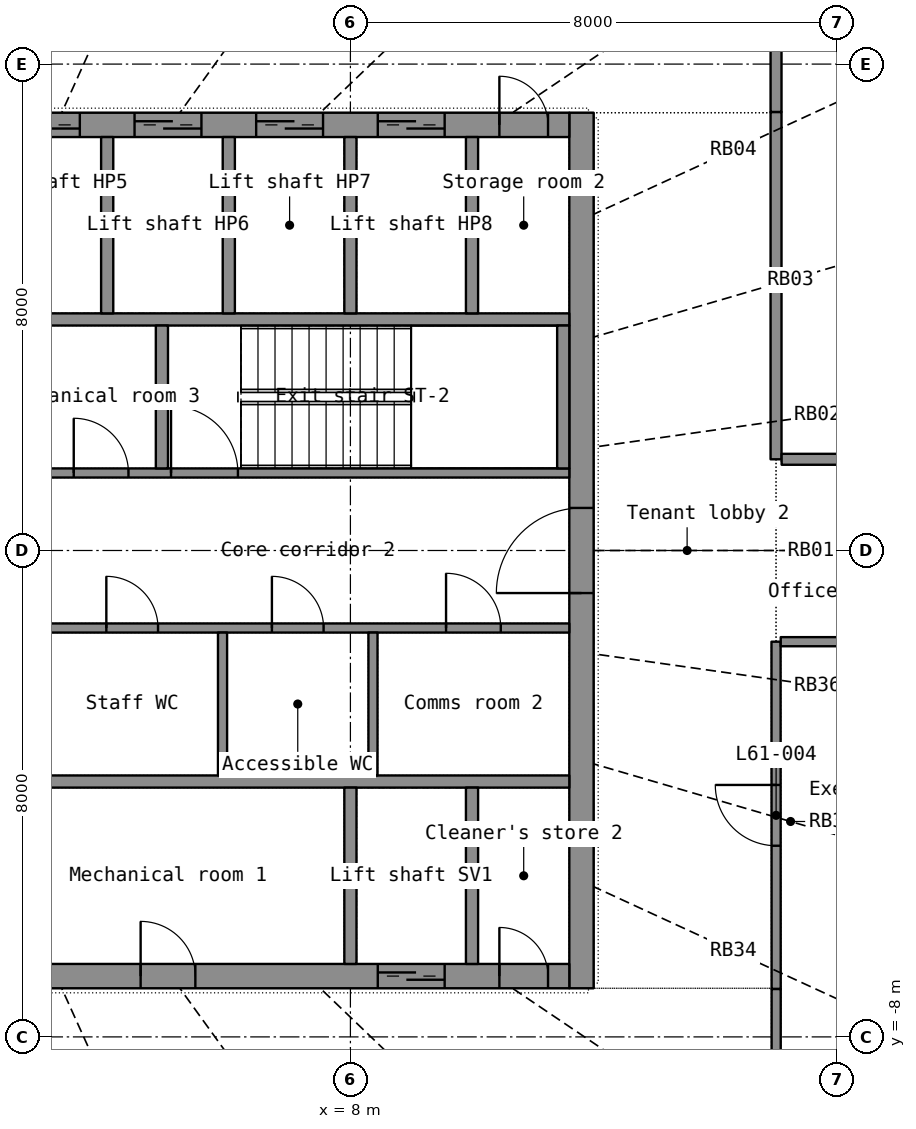
"""IFC4 building model, lengths in metres.
Left out: names, types, materials, properties, quantities, classifications, styles, units other than length and angle.
Written with IfcOpenShell. Run it as: python <this file> out.ifc"""

import sys

from ifc_helpers import new_model, si_unit, direction, frame, frame_2d, origin, place, context, subcontext, project, spatial, rectangle, extrude, element, fill, save


model = new_model("IFC4")
c1 = context("Model", 3, precision=1e-05, world=origin(), true_north=direction((0.0, 1.0)))
c2 = subcontext(c1, "Body", "Model", "MODEL_VIEW")
j1 = project(units=[si_unit("LENGTHUNIT", "METRE"), si_unit("PLANEANGLEUNIT", "RADIAN")], contexts=[c1])
p1 = place(None, origin())
s1 = spatial("IfcSite", under=j1, at=p1, CompositionType="ELEMENT")
p2 = place(p1, origin())
s2 = spatial("IfcBuilding", under=s1, at=p2, CompositionType="ELEMENT")
p3 = place(p2, frame((0.0, 0.0, 250.4)))
s3 = spatial("IfcBuildingStorey", under=s2, at=p3, CompositionType="ELEMENT", Elevation=250.4)
p4 = place(p3, frame((11.8, -7.2, 0.0), z_axis=(0.0, 0.0, 1.0), x_axis=(0.0, 1.0, 0.0)))
e1 = element("IfcWall", 1, at=p4, inside=s3, PredefinedType="SHEAR", context=c2, shape_type="SweptSolid", body=[
    extrude(rectangle(XDim=14.4, YDim=0.4, at=frame_2d((7.2, 0.0))), origin(), (0.0, 0.0, 1.0), 3.3),
])
p5 = place(p4, frame((6.5, 0.0, 0.0)))
e2 = element("IfcOpeningElement", 2, at=p5, cuts=e1, PredefinedType="OPENING", context=c2, shape_type="SweptSolid", body=[
    extrude(rectangle(XDim=1.4, YDim=2.2, at=frame_2d((0.7, 1.1))), frame((0.0, 0.21, 0.0), z_axis=(0.0, -1.0, 0.0), x_axis=(1.0, 0.0, 0.0)), (0.0, 0.0, 1.0), 0.42),
])
p6 = place(p3, frame((-11.6, -7.0, 0.0), z_axis=(0.0, 0.0, 1.0), x_axis=(1.0, 0.0, 0.0)))
e3 = element("IfcWall", 3, at=p6, inside=s3, PredefinedType="SHEAR", context=c2, shape_type="SweptSolid", body=[
    extrude(rectangle(XDim=23.2, YDim=0.4, at=frame_2d((11.6, 0.0))), origin(), (0.0, 0.0, 1.0), 3.3),
])
p7 = place(p6, frame((20.05, 0.0, 0.0)))
e4 = element("IfcOpeningElement", 4, at=p7, cuts=e3, PredefinedType="OPENING", context=c2, shape_type="SweptSolid", body=[
    extrude(rectangle(XDim=1.1, YDim=2.2, at=frame_2d((0.55, 1.1))), frame((0.0, 0.21, 0.0), z_axis=(0.0, -1.0, 0.0), x_axis=(1.0, 0.0, 0.0)), (0.0, 0.0, 1.0), 0.42),
])
p8 = place(p6, frame((4.15, 0.0, 0.0)))
e5 = element("IfcOpeningElement", 5, at=p8, cuts=e3, PredefinedType="OPENING", context=c2, shape_type="SweptSolid", body=[
    extrude(rectangle(XDim=0.9, YDim=2.1, at=frame_2d((0.45, 1.05))), frame((0.0, 0.21, 0.0), z_axis=(0.0, -1.0, 0.0), x_axis=(1.0, 0.0, 0.0)), (0.0, 0.0, 1.0), 0.42),
])
p9 = place(p6, frame((10.15, 0.0, 0.0)))
e6 = element("IfcOpeningElement", 6, at=p9, cuts=e3, PredefinedType="OPENING", context=c2, shape_type="SweptSolid", body=[
    extrude(rectangle(XDim=0.9, YDim=2.1, at=frame_2d((0.45, 1.05))), frame((0.0, 0.21, 0.0), z_axis=(0.0, -1.0, 0.0), x_axis=(1.0, 0.0, 0.0)), (0.0, 0.0, 1.0), 0.42),
])
p10 = place(p6, frame((16.15, 0.0, 0.0)))
e7 = element("IfcOpeningElement", 7, at=p10, cuts=e3, PredefinedType="OPENING", context=c2, shape_type="SweptSolid", body=[
    extrude(rectangle(XDim=0.9, YDim=2.1, at=frame_2d((0.45, 1.05))), frame((0.0, 0.21, 0.0), z_axis=(0.0, -1.0, 0.0), x_axis=(1.0, 0.0, 0.0)), (0.0, 0.0, 1.0), 0.42),
])
p11 = place(p6, frame((0.35, 0.0, 0.0)))
e8 = element("IfcOpeningElement", 8, at=p11, cuts=e3, PredefinedType="OPENING", context=c2, shape_type="SweptSolid", body=[
    extrude(rectangle(XDim=0.8, YDim=2.05, at=frame_2d((0.4, 1.025))), frame((0.0, 0.21, 0.0), z_axis=(0.0, -1.0, 0.0), x_axis=(1.0, 0.0, 0.0)), (0.0, 0.0, 1.0), 0.42),
])
p12 = place(p6, frame((22.05, 0.0, 0.0)))
e9 = element("IfcOpeningElement", 9, at=p12, cuts=e3, PredefinedType="OPENING", context=c2, shape_type="SweptSolid", body=[
    extrude(rectangle(XDim=0.8, YDim=2.05, at=frame_2d((0.4, 1.025))), frame((0.0, 0.21, 0.0), z_axis=(0.0, -1.0, 0.0), x_axis=(1.0, 0.0, 0.0)), (0.0, 0.0, 1.0), 0.42),
])
p13 = place(p3, frame((-11.6, 7.0, 0.0), z_axis=(0.0, 0.0, 1.0), x_axis=(1.0, 0.0, 0.0)))
e10 = element("IfcWall", 10, at=p13, inside=s3, PredefinedType="SHEAR", context=c2, shape_type="SweptSolid", body=[
    extrude(rectangle(XDim=23.2, YDim=0.4, at=frame_2d((11.6, 0.0))), origin(), (0.0, 0.0, 1.0), 3.3),
])
p14 = place(p13, frame((2.05, 0.0, 0.0)))
e11 = element("IfcOpeningElement", 11, at=p14, cuts=e10, PredefinedType="OPENING", context=c2, shape_type="SweptSolid", body=[
    extrude(rectangle(XDim=1.1, YDim=2.2, at=frame_2d((0.55, 1.1))), frame((0.0, 0.21, 0.0), z_axis=(0.0, -1.0, 0.0), x_axis=(1.0, 0.0, 0.0)), (0.0, 0.0, 1.0), 0.42),
])
p15 = place(p13, frame((6.05, 0.0, 0.0)))
e12 = element("IfcOpeningElement", 12, at=p15, cuts=e10, PredefinedType="OPENING", context=c2, shape_type="SweptSolid", body=[
    extrude(rectangle(XDim=1.1, YDim=2.2, at=frame_2d((0.55, 1.1))), frame((0.0, 0.21, 0.0), z_axis=(0.0, -1.0, 0.0), x_axis=(1.0, 0.0, 0.0)), (0.0, 0.0, 1.0), 0.42),
])
p16 = place(p13, frame((8.05, 0.0, 0.0)))
e13 = element("IfcOpeningElement", 13, at=p16, cuts=e10, PredefinedType="OPENING", context=c2, shape_type="SweptSolid", body=[
    extrude(rectangle(XDim=1.1, YDim=2.2, at=frame_2d((0.55, 1.1))), frame((0.0, 0.21, 0.0), z_axis=(0.0, -1.0, 0.0), x_axis=(1.0, 0.0, 0.0)), (0.0, 0.0, 1.0), 0.42),
])
p17 = place(p13, frame((10.05, 0.0, 0.0)))
e14 = element("IfcOpeningElement", 14, at=p17, cuts=e10, PredefinedType="OPENING", context=c2, shape_type="SweptSolid", body=[
    extrude(rectangle(XDim=1.1, YDim=2.2, at=frame_2d((0.55, 1.1))), frame((0.0, 0.21, 0.0), z_axis=(0.0, -1.0, 0.0), x_axis=(1.0, 0.0, 0.0)), (0.0, 0.0, 1.0), 0.42),
])
p18 = place(p13, frame((12.05, 0.0, 0.0)))
e15 = element("IfcOpeningElement", 15, at=p18, cuts=e10, PredefinedType="OPENING", context=c2, shape_type="SweptSolid", body=[
    extrude(rectangle(XDim=1.1, YDim=2.2, at=frame_2d((0.55, 1.1))), frame((0.0, 0.21, 0.0), z_axis=(0.0, -1.0, 0.0), x_axis=(1.0, 0.0, 0.0)), (0.0, 0.0, 1.0), 0.42),
])
p19 = place(p13, frame((14.05, 0.0, 0.0)))
e16 = element("IfcOpeningElement", 16, at=p19, cuts=e10, PredefinedType="OPENING", context=c2, shape_type="SweptSolid", body=[
    extrude(rectangle(XDim=1.1, YDim=2.2, at=frame_2d((0.55, 1.1))), frame((0.0, 0.21, 0.0), z_axis=(0.0, -1.0, 0.0), x_axis=(1.0, 0.0, 0.0)), (0.0, 0.0, 1.0), 0.42),
])
p20 = place(p13, frame((16.05, 0.0, 0.0)))
e17 = element("IfcOpeningElement", 17, at=p20, cuts=e10, PredefinedType="OPENING", context=c2, shape_type="SweptSolid", body=[
    extrude(rectangle(XDim=1.1, YDim=2.2, at=frame_2d((0.55, 1.1))), frame((0.0, 0.21, 0.0), z_axis=(0.0, -1.0, 0.0), x_axis=(1.0, 0.0, 0.0)), (0.0, 0.0, 1.0), 0.42),
])
p21 = place(p13, frame((18.05, 0.0, 0.0)))
e18 = element("IfcOpeningElement", 18, at=p21, cuts=e10, PredefinedType="OPENING", context=c2, shape_type="SweptSolid", body=[
    extrude(rectangle(XDim=1.1, YDim=2.2, at=frame_2d((0.55, 1.1))), frame((0.0, 0.21, 0.0), z_axis=(0.0, -1.0, 0.0), x_axis=(1.0, 0.0, 0.0)), (0.0, 0.0, 1.0), 0.42),
])
p22 = place(p13, frame((20.05, 0.0, 0.0)))
e19 = element("IfcOpeningElement", 19, at=p22, cuts=e10, PredefinedType="OPENING", context=c2, shape_type="SweptSolid", body=[
    extrude(rectangle(XDim=1.1, YDim=2.2, at=frame_2d((0.55, 1.1))), frame((0.0, 0.21, 0.0), z_axis=(0.0, -1.0, 0.0), x_axis=(1.0, 0.0, 0.0)), (0.0, 0.0, 1.0), 0.42),
])
p23 = place(p13, frame((4.15, 0.0, 0.0)))
e20 = element("IfcOpeningElement", 20, at=p23, cuts=e10, PredefinedType="OPENING", context=c2, shape_type="SweptSolid", body=[
    extrude(rectangle(XDim=0.9, YDim=2.1, at=frame_2d((0.45, 1.05))), frame((0.0, 0.21, 0.0), z_axis=(0.0, -1.0, 0.0), x_axis=(1.0, 0.0, 0.0)), (0.0, 0.0, 1.0), 0.42),
])
p24 = place(p13, frame((0.35, 0.0, 0.0)))
e21 = element("IfcOpeningElement", 21, at=p24, cuts=e10, PredefinedType="OPENING", context=c2, shape_type="SweptSolid", body=[
    extrude(rectangle(XDim=0.8, YDim=2.05, at=frame_2d((0.4, 1.025))), frame((0.0, 0.21, 0.0), z_axis=(0.0, -1.0, 0.0), x_axis=(1.0, 0.0, 0.0)), (0.0, 0.0, 1.0), 0.42),
])
p25 = place(p13, frame((22.05, 0.0, 0.0)))
e22 = element("IfcOpeningElement", 22, at=p25, cuts=e10, PredefinedType="OPENING", context=c2, shape_type="SweptSolid", body=[
    extrude(rectangle(XDim=0.8, YDim=2.05, at=frame_2d((0.4, 1.025))), frame((0.0, 0.21, 0.0), z_axis=(0.0, -1.0, 0.0), x_axis=(1.0, 0.0, 0.0)), (0.0, 0.0, 1.0), 0.42),
])
for number, where, z_axis, x_axis in (
    (23, (-11.6, -3.8, 0.0), (0.0, 0.0, 1.0), (1.0, 0.0, 0.0)),
    (24, (-11.6, 3.8, 0.0), (0.0, 0.0, 1.0), (1.0, 0.0, 0.0)),
):
    element("IfcWall", number, at=place(p3, frame(where, z_axis=z_axis, x_axis=x_axis)), inside=s3, PredefinedType="SHEAR", context=c2, shape_type="SweptSolid", body=[
        extrude(rectangle(XDim=23.2, YDim=0.2, at=frame_2d((11.6, 0.0))), origin(), (0.0, 0.0, 1.0), 3.3),
    ])
for number, where, z_axis, x_axis in (
    (25, (8.0, -6.8, 0.0), (0.0, 0.0, 1.0), (0.0, 1.0, 0.0)),
    (26, (10.0, -6.8, 0.0), (0.0, 0.0, 1.0), (0.0, 1.0, 0.0)),
    (27, (4.0, 3.9, 0.0), (0.0, 0.0, 1.0), (0.0, 1.0, 0.0)),
    (28, (6.0, 3.9, 0.0), (0.0, 0.0, 1.0), (0.0, 1.0, 0.0)),
    (29, (8.0, 3.9, 0.0), (0.0, 0.0, 1.0), (0.0, 1.0, 0.0)),
    (30, (10.0, 3.9, 0.0), (0.0, 0.0, 1.0), (0.0, 1.0, 0.0)),
):
    element("IfcWall", number, at=place(p3, frame(where, z_axis=z_axis, x_axis=x_axis)), inside=s3, PredefinedType="SHEAR", context=c2, shape_type="SweptSolid", body=[
        extrude(rectangle(XDim=2.9, YDim=0.2, at=frame_2d((1.45, 0.0))), origin(), (0.0, 0.0, 1.0), 3.3),
    ])
p26 = place(p3, frame((3.0, -1.275, 0.0), z_axis=(0.0, 0.0, 1.0), x_axis=(1.0, 0.0, 0.0)))
e31 = element("IfcWall", 31, at=p26, inside=s3, PredefinedType="PARTITIONING", context=c2, shape_type="SweptSolid", body=[
    extrude(rectangle(XDim=8.6, YDim=0.15, at=frame_2d((4.3, 0.0))), origin(), (0.0, 0.0, 1.0), 3.3),
])
p27 = place(p26, frame((0.986, 0.0, 0.0)))
e32 = element("IfcOpeningElement", 32, at=p27, cuts=e31, PredefinedType="OPENING", context=c2, shape_type="SweptSolid", body=[
    extrude(rectangle(XDim=0.85, YDim=2.1, at=frame_2d((0.425, 1.05))), frame((0.0, 0.085, 0.0), z_axis=(0.0, -1.0, 0.0), x_axis=(1.0, 0.0, 0.0)), (0.0, 0.0, 1.0), 0.17),
])
p28 = place(p26, frame((3.709, 0.0, 0.0)))
e33 = element("IfcOpeningElement", 33, at=p28, cuts=e31, PredefinedType="OPENING", context=c2, shape_type="SweptSolid", body=[
    extrude(rectangle(XDim=0.85, YDim=2.1, at=frame_2d((0.425, 1.05))), frame((0.0, 0.085, 0.0), z_axis=(0.0, -1.0, 0.0), x_axis=(1.0, 0.0, 0.0)), (0.0, 0.0, 1.0), 0.17),
])
p29 = place(p26, frame((6.573, 0.0, 0.0)))
e34 = element("IfcOpeningElement", 34, at=p29, cuts=e31, PredefinedType="OPENING", context=c2, shape_type="SweptSolid", body=[
    extrude(rectangle(XDim=0.9, YDim=2.1, at=frame_2d((0.45, 1.05))), frame((0.0, 0.085, 0.0), z_axis=(0.0, -1.0, 0.0), x_axis=(1.0, 0.0, 0.0)), (0.0, 0.0, 1.0), 0.17),
])
p30 = place(p3, frame((3.0, 1.275, 0.0), z_axis=(0.0, 0.0, 1.0), x_axis=(1.0, 0.0, 0.0)))
e35 = element("IfcWall", 35, at=p30, inside=s3, PredefinedType="SHEAR", context=c2, shape_type="SweptSolid", body=[
    extrude(rectangle(XDim=8.6, YDim=0.15, at=frame_2d((4.3, 0.0))), origin(), (0.0, 0.0, 1.0), 3.3),
])
p31 = place(p30, frame((2.05, 0.0, 0.0)))
e36 = element("IfcOpeningElement", 36, at=p31, cuts=e35, PredefinedType="OPENING", context=c2, shape_type="SweptSolid", body=[
    extrude(rectangle(XDim=1.1, YDim=2.15, at=frame_2d((0.55, 1.075))), frame((0.0, 0.085, 0.0), z_axis=(0.0, -1.0, 0.0), x_axis=(1.0, 0.0, 0.0)), (0.0, 0.0, 1.0), 0.17),
])
p32 = place(p30, frame((0.45, 0.0, 0.0)))
e37 = element("IfcOpeningElement", 37, at=p32, cuts=e35, PredefinedType="OPENING", context=c2, shape_type="SweptSolid", body=[
    extrude(rectangle(XDim=0.9, YDim=2.1, at=frame_2d((0.45, 1.05))), frame((0.0, 0.085, 0.0), z_axis=(0.0, -1.0, 0.0), x_axis=(1.0, 0.0, 0.0)), (0.0, 0.0, 1.0), 0.17),
])
for number, where, z_axis, x_axis in (
    (38, (11.5, 1.35, 0.0), (0.0, 0.0, 1.0), (0.0, 1.0, 0.0)),
    (39, (4.9, 1.35, 0.0), (0.0, 0.0, 1.0), (0.0, 1.0, 0.0)),
):
    element("IfcWall", number, at=place(p3, frame(where, z_axis=z_axis, x_axis=x_axis)), inside=s3, PredefinedType="SHEAR", context=c2, shape_type="SweptSolid", body=[
        extrude(rectangle(XDim=2.35, YDim=0.2, at=frame_2d((1.175, 0.0))), origin(), (0.0, 0.0, 1.0), 3.3),
    ])
for number, where, z_axis, x_axis in (
    (40, (5.897, -3.7, 0.0), (0.0, 0.0, 1.0), (0.0, 1.0, 0.0)),
    (41, (8.371, -3.7, 0.0), (0.0, 0.0, 1.0), (0.0, 1.0, 0.0)),
):
    element("IfcWall", number, at=place(p3, frame(where, z_axis=z_axis, x_axis=x_axis)), inside=s3, PredefinedType="PARTITIONING", context=c2, shape_type="SweptSolid", body=[
        extrude(rectangle(XDim=2.35, YDim=0.15, at=frame_2d((1.175, 0.0))), origin(), (0.0, 0.0, 1.0), 3.3),
    ])
p33 = place(p3, frame((15.0, 1.5, 0.0), z_axis=(0.0, 0.0, 1.0), x_axis=(0.0, 1.0, 0.0)))
e42 = element("IfcWall", 42, at=p33, inside=s3, PredefinedType="PARTITIONING", context=c2, shape_type="SweptSolid", body=[
    extrude(rectangle(XDim=5.712, YDim=0.18, at=frame_2d((2.856, 0.0))), origin(), (0.0, 0.0, 1.0), 2.4),
])
p34 = place(p3, frame((15.002, -7.212, 0.0), z_axis=(0.0, 0.0, 1.0), x_axis=(-0.000341939, 0.999999942, 0.0)))
e43 = element("IfcWall", 43, at=p34, inside=s3, PredefinedType="PARTITIONING", context=c2, shape_type="SweptSolid", body=[
    extrude(rectangle(XDim=5.712, YDim=0.15, at=frame_2d((2.856, 0.0))), origin(), (0.0, 0.0, 1.0), 2.4),
])
p35 = place(p34, frame((2.356, 0.0, 0.0)))
e44 = element("IfcOpeningElement", 44, at=p35, cuts=e43, PredefinedType="OPENING", context=c2, shape_type="SweptSolid", body=[
    extrude(rectangle(XDim=1.0, YDim=2.4, at=frame_2d((0.5, 1.2))), frame((0.0, 0.085, 0.0), z_axis=(0.0, -1.0, 0.0), x_axis=(1.0, 0.0, 0.0)), (0.0, 0.0, 1.0), 0.17),
])
p36 = place(p3, frame((15.077, -1.5, 0.0), z_axis=(0.0, 0.0, 1.0), x_axis=(1.0, 0.0, 0.0)))
e45 = element("IfcWall", 45, at=p36, inside=s3, PredefinedType="PARTITIONING", context=c2, shape_type="SweptSolid", body=[
    extrude(rectangle(XDim=2.871, YDim=0.15, at=frame_2d((1.436, 0.0))), origin(), (0.0, 0.0, 1.0), 2.4),
])
p37 = place(p3, frame((17.948, 1.5, 0.0), z_axis=(0.0, 0.0, 1.0), x_axis=(-1.0, 0.0, 0.0)))
e46 = element("IfcWall", 46, at=p37, inside=s3, PredefinedType="PARTITIONING", context=c2, shape_type="SweptSolid", body=[
    extrude(rectangle(XDim=2.856, YDim=0.18, at=frame_2d((1.428, 0.0))), origin(), (0.0, 0.0, 1.0), 2.4),
])
p38 = place(p3, frame((15.002, -9.525, 0.0), z_axis=(0.0, 0.0, 1.0), x_axis=(0.0, 1.0, 0.0)))
e47 = element("IfcWall", 47, at=p38, inside=s3, PredefinedType="PARTITIONING", context=c2, shape_type="SweptSolid", body=[
    extrude(rectangle(XDim=2.312, YDim=0.15, at=frame_2d((1.156, 0.0))), origin(), (0.0, 0.0, 1.0), 2.4),
])
p39 = place(p3, frame((15.0, 7.213, 0.0), z_axis=(0.0, 0.0, 1.0), x_axis=(0.0, 1.0, 0.0)))
e48 = element("IfcWall", 48, at=p39, inside=s3, PredefinedType="PARTITIONING", context=c2, shape_type="SweptSolid", body=[
    extrude(rectangle(XDim=2.295, YDim=0.18, at=frame_2d((1.147, 0.0))), origin(), (0.0, 0.0, 1.0), 2.4),
])
p40 = place(p7, origin())
e49 = element("IfcDoor", 49, at=p40, inside=s3, OperationType="DOUBLE_DOOR_SLIDING", PredefinedType="DOOR", context=c2, shape_type="SweptSolid", body=[
    extrude(rectangle(XDim=1.1, YDim=2.2, at=frame_2d((0.55, 1.1))), frame((0.0, 0.025, 0.0), z_axis=(0.0, -1.0, 0.0), x_axis=(1.0, 0.0, 0.0)), (0.0, 0.0, 1.0), 0.05),
])
fill(e4, e49)
p41 = place(p10, origin())
e50 = element("IfcDoor", 50, at=p41, inside=s3, OperationType="SINGLE_SWING_LEFT", PredefinedType="DOOR", context=c2, shape_type="SweptSolid", body=[
    extrude(rectangle(XDim=0.9, YDim=2.1, at=frame_2d((0.45, 1.05))), frame((0.0, 0.025, 0.0), z_axis=(0.0, -1.0, 0.0), x_axis=(1.0, 0.0, 0.0)), (0.0, 0.0, 1.0), 0.05),
])
fill(e7, e50)
p42 = place(p12, origin())
e51 = element("IfcDoor", 51, at=p42, inside=s3, OperationType="SINGLE_SWING_LEFT", PredefinedType="DOOR", context=c2, shape_type="SweptSolid", body=[
    extrude(rectangle(XDim=0.8, YDim=2.05, at=frame_2d((0.4, 1.025))), frame((0.0, 0.025, 0.0), z_axis=(0.0, -1.0, 0.0), x_axis=(1.0, 0.0, 0.0)), (0.0, 0.0, 1.0), 0.05),
])
fill(e9, e51)
p43 = place(p19, origin())
e52 = element("IfcDoor", 52, at=p43, inside=s3, OperationType="DOUBLE_DOOR_SLIDING", PredefinedType="DOOR", context=c2, shape_type="SweptSolid", body=[
    extrude(rectangle(XDim=1.1, YDim=2.2, at=frame_2d((0.55, 1.1))), frame((0.0, 0.025, 0.0), z_axis=(0.0, -1.0, 0.0), x_axis=(1.0, 0.0, 0.0)), (0.0, 0.0, 1.0), 0.05),
])
fill(e16, e52)
p44 = place(p20, origin())
e53 = element("IfcDoor", 53, at=p44, inside=s3, OperationType="DOUBLE_DOOR_SLIDING", PredefinedType="DOOR", context=c2, shape_type="SweptSolid", body=[
    extrude(rectangle(XDim=1.1, YDim=2.2, at=frame_2d((0.55, 1.1))), frame((0.0, 0.025, 0.0), z_axis=(0.0, -1.0, 0.0), x_axis=(1.0, 0.0, 0.0)), (0.0, 0.0, 1.0), 0.05),
])
fill(e17, e53)
p45 = place(p21, origin())
e54 = element("IfcDoor", 54, at=p45, inside=s3, OperationType="DOUBLE_DOOR_SLIDING", PredefinedType="DOOR", context=c2, shape_type="SweptSolid", body=[
    extrude(rectangle(XDim=1.1, YDim=2.2, at=frame_2d((0.55, 1.1))), frame((0.0, 0.025, 0.0), z_axis=(0.0, -1.0, 0.0), x_axis=(1.0, 0.0, 0.0)), (0.0, 0.0, 1.0), 0.05),
])
fill(e18, e54)
p46 = place(p22, origin())
e55 = element("IfcDoor", 55, at=p46, inside=s3, OperationType="DOUBLE_DOOR_SLIDING", PredefinedType="DOOR", context=c2, shape_type="SweptSolid", body=[
    extrude(rectangle(XDim=1.1, YDim=2.2, at=frame_2d((0.55, 1.1))), frame((0.0, 0.025, 0.0), z_axis=(0.0, -1.0, 0.0), x_axis=(1.0, 0.0, 0.0)), (0.0, 0.0, 1.0), 0.05),
])
fill(e19, e55)
p47 = place(p25, origin())
e56 = element("IfcDoor", 56, at=p47, inside=s3, OperationType="SINGLE_SWING_LEFT", PredefinedType="DOOR", context=c2, shape_type="SweptSolid", body=[
    extrude(rectangle(XDim=0.8, YDim=2.05, at=frame_2d((0.4, 1.025))), frame((0.0, 0.025, 0.0), z_axis=(0.0, -1.0, 0.0), x_axis=(1.0, 0.0, 0.0)), (0.0, 0.0, 1.0), 0.05),
])
fill(e22, e56)
p48 = place(p5, origin())
e57 = element("IfcDoor", 57, at=p48, inside=s3, OperationType="DOUBLE_DOOR_SINGLE_SWING", PredefinedType="DOOR", context=c2, shape_type="SweptSolid", body=[
    extrude(rectangle(XDim=1.4, YDim=2.2, at=frame_2d((0.7, 1.1))), frame((0.0, 0.025, 0.0), z_axis=(0.0, -1.0, 0.0), x_axis=(1.0, 0.0, 0.0)), (0.0, 0.0, 1.0), 0.05),
])
fill(e2, e57)
p49 = place(p31, origin())
e58 = element("IfcDoor", 58, at=p49, inside=s3, OperationType="SINGLE_SWING_LEFT", PredefinedType="DOOR", context=c2, shape_type="SweptSolid", body=[
    extrude(rectangle(XDim=1.1, YDim=2.15, at=frame_2d((0.55, 1.075))), frame((0.0, 0.025, 0.0), z_axis=(0.0, -1.0, 0.0), x_axis=(1.0, 0.0, 0.0)), (0.0, 0.0, 1.0), 0.05),
])
fill(e36, e58)
p50 = place(p27, origin())
e59 = element("IfcDoor", 59, at=p50, inside=s3, OperationType="SINGLE_SWING_LEFT", PredefinedType="DOOR", context=c2, shape_type="SweptSolid", body=[
    extrude(rectangle(XDim=0.85, YDim=2.1, at=frame_2d((0.425, 1.05))), frame((0.0, 0.025, 0.0), z_axis=(0.0, -1.0, 0.0), x_axis=(1.0, 0.0, 0.0)), (0.0, 0.0, 1.0), 0.05),
])
fill(e32, e59)
p51 = place(p28, origin())
e60 = element("IfcDoor", 60, at=p51, inside=s3, OperationType="SINGLE_SWING_LEFT", PredefinedType="DOOR", context=c2, shape_type="SweptSolid", body=[
    extrude(rectangle(XDim=0.85, YDim=2.1, at=frame_2d((0.425, 1.05))), frame((0.0, 0.025, 0.0), z_axis=(0.0, -1.0, 0.0), x_axis=(1.0, 0.0, 0.0)), (0.0, 0.0, 1.0), 0.05),
])
fill(e33, e60)
p52 = place(p29, origin())
e61 = element("IfcDoor", 61, at=p52, inside=s3, OperationType="SINGLE_SWING_LEFT", PredefinedType="DOOR", context=c2, shape_type="SweptSolid", body=[
    extrude(rectangle(XDim=0.9, YDim=2.1, at=frame_2d((0.45, 1.05))), frame((0.0, 0.025, 0.0), z_axis=(0.0, -1.0, 0.0), x_axis=(1.0, 0.0, 0.0)), (0.0, 0.0, 1.0), 0.05),
])
fill(e34, e61)
p53 = place(p32, origin())
e62 = element("IfcDoor", 62, at=p53, inside=s3, OperationType="SINGLE_SWING_LEFT", PredefinedType="DOOR", context=c2, shape_type="SweptSolid", body=[
    extrude(rectangle(XDim=0.9, YDim=2.1, at=frame_2d((0.45, 1.05))), frame((0.0, 0.025, 0.0), z_axis=(0.0, -1.0, 0.0), x_axis=(1.0, 0.0, 0.0)), (0.0, 0.0, 1.0), 0.05),
])
fill(e37, e62)
p54 = place(p35, origin())
e63 = element("IfcDoor", 63, at=p54, inside=s3, OperationType="SINGLE_SWING_RIGHT", PredefinedType="DOOR", context=c2, shape_type="SweptSolid", body=[
    extrude(rectangle(XDim=1.0, YDim=2.4, at=frame_2d((0.5, 1.2))), frame((0.0, 0.025, 0.0), z_axis=(0.0, -1.0, 0.0), x_axis=(1.0, 0.0, 0.0)), (0.0, 0.0, 1.0), 0.05),
])
fill(e44, e63)
save(model, sys.argv[1])
